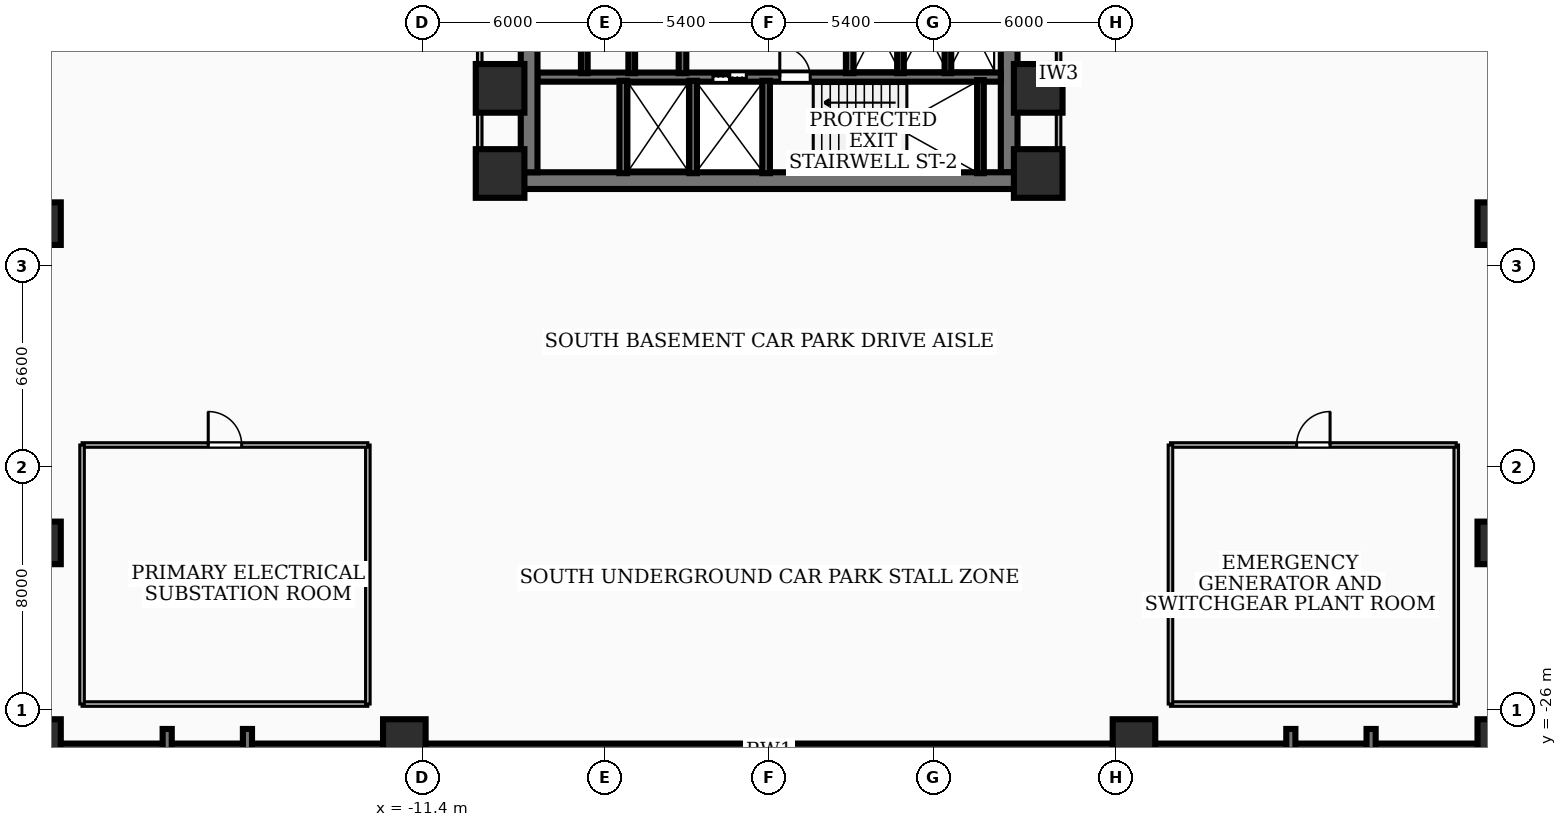
"""IFC4 building model, lengths in metres.
Left out: names, types, materials, properties, quantities, classifications, styles, units other than length and angle.
Written with IfcOpenShell. Run it as: python <this file> out.ifc"""

import sys

from ifc_helpers import new_model, si_unit, direction, frame, frame_2d, origin, origin_2d, place, context, subcontext, project, spatial, rectangle, extrude, element, fill, save


model = new_model("IFC4")
c1 = context("Model", 3, precision=1e-05, world=origin(), true_north=direction((0.0, 1.0)))
c2 = subcontext(c1, "Body", "Model", "MODEL_VIEW")
j1 = project(units=[si_unit("LENGTHUNIT", "METRE"), si_unit("PLANEANGLEUNIT", "RADIAN")], contexts=[c1])
p1 = place(None, origin())
s1 = spatial("IfcSite", under=j1, at=p1, CompositionType="ELEMENT")
p2 = place(p1, origin())
s2 = spatial("IfcBuilding", under=s1, at=p2, CompositionType="ELEMENT")
p3 = place(p2, frame((0.0, 0.0, -4.5)))
s3 = spatial("IfcBuildingStorey", under=s2, at=p3, CompositionType="ELEMENT", Elevation=-4.5)
p4 = place(p3, frame((8.78, -8.585, 0.0), z_axis=(0.0, 0.0, 1.0), x_axis=(-1.0, 0.0, 0.0)))
e1 = element("IfcWall", 1, at=p4, inside=s3, PredefinedType="SHEAR", context=c2, shape_type="SweptSolid", body=[
    extrude(rectangle(XDim=17.56, YDim=0.55, at=frame_2d((8.78, 0.0))), origin(), (0.0, 0.0, 1.0), 4.18),
])
for number, where, z_axis, x_axis in (
    (2, (-7.895, -8.31, 0.0), (0.0, 0.0, 1.0), (0.0, 1.0, 0.0)),
    (3, (7.895, -2.025, 0.0), (0.0, 0.0, 1.0), (0.0, -1.0, 0.0)),
):
    element("IfcWall", number, at=place(p3, frame(where, z_axis=z_axis, x_axis=x_axis)), inside=s3, PredefinedType="SHEAR", context=c2, shape_type="SweptSolid", body=[
        extrude(rectangle(XDim=6.285, YDim=0.55, at=frame_2d((3.143, 0.0))), origin(), (0.0, 0.0, 1.0), 4.18),
    ])
p5 = place(p3, frame((-7.62, -5.18, 0.0), z_axis=(0.0, 0.0, 1.0), x_axis=(1.0, 0.0, 0.0)))
e4 = element("IfcWall", 4, at=p5, inside=s3, PredefinedType="SOLIDWALL", context=c2, shape_type="SweptSolid", body=[
    extrude(rectangle(XDim=15.24, YDim=0.3, at=frame_2d((7.62, 0.0))), origin(), (0.0, 0.0, 1.0), 4.18),
])
p6 = place(p5, frame((5.77, 0.0, 0.0)))
e5 = element("IfcOpeningElement", 5, at=p6, cuts=e4, PredefinedType="OPENING", context=c2, shape_type="SweptSolid", body=[
    extrude(rectangle(XDim=1.1, YDim=2.15, at=frame_2d((0.55, 1.075))), frame((0.0, 0.16, 0.0), z_axis=(0.0, -1.0, 0.0), x_axis=(1.0, 0.0, 0.0)), (0.0, 0.0, 1.0), 0.32),
])
p7 = place(p5, frame((7.97, 0.0, 0.0)))
e6 = element("IfcOpeningElement", 6, at=p7, cuts=e4, PredefinedType="OPENING", context=c2, shape_type="SweptSolid", body=[
    extrude(rectangle(XDim=1.0, YDim=2.1, at=frame_2d((0.5, 1.05))), frame((0.0, 0.16, 0.0), z_axis=(0.0, -1.0, 0.0), x_axis=(1.0, 0.0, 0.0)), (0.0, 0.0, 1.0), 0.32),
])
p8 = place(p3, frame((6.95, -8.34, 0.0), z_axis=(0.0, 0.0, 1.0), x_axis=(0.0, 1.0, 0.0)))
e7 = element("IfcWall", 7, at=p8, inside=s3, PredefinedType="SOLIDWALL", context=c2, shape_type="SweptSolid", body=[
    extrude(rectangle(XDim=3.06, YDim=0.22, at=frame_2d((1.53, 0.0))), origin(), (0.0, 0.0, 1.0), 4.18),
])
for number, where, z_axis, x_axis in (
    (8, (-0.1, -8.34, 0.0), (0.0, 0.0, 1.0), (0.0, 1.0, 0.0)),
    (9, (-2.5, -8.34, 0.0), (0.0, 0.0, 1.0), (0.0, 1.0, 0.0)),
    (10, (-4.8, -8.34, 0.0), (0.0, 0.0, 1.0), (0.0, 1.0, 0.0)),
):
    element("IfcWall", number, at=place(p3, frame(where, z_axis=z_axis, x_axis=x_axis)), inside=s3, PredefinedType="SOLIDWALL", context=c2, shape_type="SweptSolid", body=[
        extrude(rectangle(XDim=3.04, YDim=0.25, at=frame_2d((1.52, 0.0))), origin(), (0.0, 0.0, 1.0), 4.18),
    ])
for number, where, z_axis, x_axis in (
    (11, (-2.85, -5.05, 0.0), (0.0, 0.0, 1.0), (0.0, 1.0, 0.0)),
    (12, (2.65, -5.05, 0.0), (0.0, 0.0, 1.0), (0.0, 1.0, 0.0)),
):
    element("IfcWall", number, at=place(p3, frame(where, z_axis=z_axis, x_axis=x_axis)), inside=s3, PredefinedType="SOLIDWALL", context=c2, shape_type="SweptSolid", body=[
        extrude(rectangle(XDim=3.07, YDim=0.25, at=frame_2d((1.535, 0.0))), origin(), (0.0, 0.0, 1.0), 4.18),
    ])
for number, where, z_axis, x_axis in (
    (13, (4.32, -5.05, 0.0), (0.0, 0.0, 1.0), (0.0, 1.0, 0.0)),
    (14, (5.88, -5.05, 0.0), (0.0, 0.0, 1.0), (0.0, 1.0, 0.0)),
    (15, (-6.08, -5.05, 0.0), (0.0, 0.0, 1.0), (0.0, 1.0, 0.0)),
    (16, (-4.52, -5.05, 0.0), (0.0, 0.0, 1.0), (0.0, 1.0, 0.0)),
):
    element("IfcWall", number, at=place(p3, frame(where, z_axis=z_axis, x_axis=x_axis)), inside=s3, PredefinedType="SOLIDWALL", context=c2, shape_type="SweptSolid", body=[
        extrude(rectangle(XDim=3.07, YDim=0.22, at=frame_2d((1.535, 0.0))), origin(), (0.0, 0.0, 1.0), 4.18),
    ])
p9 = place(p3, frame((35.75, -27.35, 0.0), z_axis=(0.0, 0.0, 1.0), x_axis=(-1.0, 0.0, 0.0)))
e17 = element("IfcWall", 17, at=p9, inside=s3, PredefinedType="USERDEFINED", context=c2, shape_type="SweptSolid", body=[
    extrude(rectangle(XDim=71.5, YDim=0.5, at=frame_2d((35.75, 0.0))), origin(), (0.0, 0.0, 1.0), 4.18),
])
p10 = place(p3, frame((-19.8, -28.58, -4.85), z_axis=(0.0, 0.0, 1.0), x_axis=(0.0, 1.0, 0.0)))
e18 = element("IfcWall", 18, at=p10, inside=s3, PredefinedType="SOLIDWALL", context=c2, shape_type="SweptSolid", body=[
    extrude(rectangle(XDim=1.96, YDim=0.3, at=frame_2d((0.98, 0.0))), origin(), (0.0, 0.0, 1.0), 9.145),
])
p11 = place(p3, frame((-17.16, -28.58, -4.85), z_axis=(0.0, 0.0, 1.0), x_axis=(0.0, 1.0, 0.0)))
e19 = element("IfcWall", 19, at=p11, inside=s3, PredefinedType="SOLIDWALL", context=c2, shape_type="SweptSolid", body=[
    extrude(rectangle(XDim=1.96, YDim=0.3, at=frame_2d((0.98, 0.0))), origin(), (0.0, 0.0, 1.0), 9.35),
])
p12 = place(p3, frame((19.8, -28.58, -4.85), z_axis=(0.0, 0.0, 1.0), x_axis=(0.0, 1.0, 0.0)))
e20 = element("IfcWall", 20, at=p12, inside=s3, PredefinedType="SOLIDWALL", context=c2, shape_type="SweptSolid", body=[
    extrude(rectangle(XDim=1.96, YDim=0.3, at=frame_2d((0.98, 0.0))), origin(), (0.0, 0.0, 1.0), 9.145),
])
p13 = place(p3, frame((17.16, -28.58, -4.85), z_axis=(0.0, 0.0, 1.0), x_axis=(0.0, 1.0, 0.0)))
e21 = element("IfcWall", 21, at=p13, inside=s3, PredefinedType="SOLIDWALL", context=c2, shape_type="SweptSolid", body=[
    extrude(rectangle(XDim=1.96, YDim=0.3, at=frame_2d((0.98, 0.0))), origin(), (0.0, 0.0, 1.0), 9.35),
])
for number, where, z_axis, x_axis in (
    (22, (-8.85, -5.55, 0.0), (0.0, 0.0, 1.0), (1.0, 0.0, 0.0)),
    (23, (8.85, -5.55, 0.0), (0.0, 0.0, 1.0), (1.0, 0.0, 0.0)),
    (24, (8.85, -8.35, 0.0), (0.0, 0.0, 1.0), (1.0, 0.0, 0.0)),
    (25, (-8.85, -8.35, 0.0), (0.0, 0.0, 1.0), (1.0, 0.0, 0.0)),
):
    element("IfcColumn", number, at=place(p3, frame(where, z_axis=z_axis, x_axis=x_axis)), inside=s3, PredefinedType="COLUMN", context=c2, shape_type="SweptSolid", body=[
        extrude(rectangle(XDim=1.6, YDim=1.6, at=origin_2d()), origin(), (0.0, 0.0, 1.0), 4.5),
    ])
for number, where, z_axis, x_axis in (
    (26, (-24.0, -27.0, 0.0), (0.0, 0.0, 1.0), (1.0, 0.0, 0.0)),
    (27, (-12.0, -27.0, 0.0), (0.0, 0.0, 1.0), (1.0, 0.0, 0.0)),
    (28, (12.0, -27.0, 0.0), (0.0, 0.0, 1.0), (1.0, 0.0, 0.0)),
    (29, (24.0, -27.0, 0.0), (0.0, 0.0, 1.0), (1.0, 0.0, 0.0)),
    (30, (-24.0, -10.0, 0.0), (0.0, 0.0, 1.0), (1.0, 0.0, 0.0)),
    (31, (24.0, -10.0, 0.0), (0.0, 0.0, 1.0), (1.0, 0.0, 0.0)),
    (32, (-24.0, -20.5, 0.0), (0.0, 0.0, 1.0), (1.0, 0.0, 0.0)),
    (33, (24.0, -20.5, 0.0), (0.0, 0.0, 1.0), (1.0, 0.0, 0.0)),
):
    element("IfcColumn", number, at=place(p3, frame(where, z_axis=z_axis, x_axis=x_axis)), inside=s3, PredefinedType="COLUMN", context=c2, shape_type="SweptSolid", body=[
        extrude(rectangle(XDim=1.4, YDim=1.4, at=origin_2d()), origin(), (0.0, 0.0, 1.0), 4.5),
    ])
for number, where, z_axis, x_axis in (
    (34, (-9.52, -8.38, 0.0), (0.0, 0.0, 1.0), (0.0, 1.0, 0.0)),
    (35, (9.52, -8.38, 0.0), (0.0, 0.0, 1.0), (0.0, 1.0, 0.0)),
):
    element("IfcWall", number, at=place(p3, frame(where, z_axis=z_axis, x_axis=x_axis)), inside=s3, PredefinedType="PARTITIONING", context=c2, shape_type="SweptSolid", body=[
        extrude(rectangle(XDim=6.63, YDim=0.15, at=frame_2d((3.315, 0.0))), origin(), (0.0, 0.0, 1.0), 3.072),
    ])
p14 = place(p3, frame((-22.6, -17.28, 0.0), z_axis=(0.0, 0.0, 1.0), x_axis=(1.0, 0.0, 0.0)))
e36 = element("IfcWall", 36, at=p14, inside=s3, PredefinedType="PARTITIONING", context=c2, shape_type="SweptSolid", body=[
    extrude(rectangle(XDim=9.4, YDim=0.15, at=frame_2d((4.7, 0.0))), origin(), (0.0, 0.0, 1.0), 4.18),
])
p15 = place(p14, frame((4.15, 0.0, 0.0)))
e37 = element("IfcOpeningElement", 37, at=p15, cuts=e36, PredefinedType="OPENING", context=c2, shape_type="SweptSolid", body=[
    extrude(rectangle(XDim=1.1, YDim=2.15, at=frame_2d((0.55, 1.075))), frame((0.0, 0.085, 0.0), z_axis=(0.0, -1.0, 0.0), x_axis=(1.0, 0.0, 0.0)), (0.0, 0.0, 1.0), 0.17),
])
for number, where, z_axis, x_axis in (
    (38, (-22.6, -25.8, 0.0), (0.0, 0.0, 1.0), (0.0, 1.0, 0.0)),
    (39, (-13.2, -25.8, 0.0), (0.0, 0.0, 1.0), (0.0, 1.0, 0.0)),
):
    element("IfcWall", number, at=place(p3, frame(where, z_axis=z_axis, x_axis=x_axis)), inside=s3, PredefinedType="PARTITIONING", context=c2, shape_type="SweptSolid", body=[
        extrude(rectangle(XDim=8.52, YDim=0.15, at=frame_2d((4.26, 0.0))), origin(), (0.0, 0.0, 1.0), 4.18),
    ])
p16 = place(p3, frame((-22.6, -25.8, 0.0), z_axis=(0.0, 0.0, 1.0), x_axis=(1.0, 0.0, 0.0)))
e40 = element("IfcWall", 40, at=p16, inside=s3, PredefinedType="PARTITIONING", context=c2, shape_type="SweptSolid", body=[
    extrude(rectangle(XDim=9.4, YDim=0.15, at=frame_2d((4.7, 0.0))), origin(), (0.0, 0.0, 1.0), 4.18),
])
p17 = place(p3, frame((13.2, -17.28, 0.0), z_axis=(0.0, 0.0, 1.0), x_axis=(1.0, 0.0, 0.0)))
e41 = element("IfcWall", 41, at=p17, inside=s3, PredefinedType="PARTITIONING", context=c2, shape_type="SweptSolid", body=[
    extrude(rectangle(XDim=9.4, YDim=0.15, at=frame_2d((4.7, 0.0))), origin(), (0.0, 0.0, 1.0), 4.18),
])
p18 = place(p17, frame((4.15, 0.0, 0.0)))
e42 = element("IfcOpeningElement", 42, at=p18, cuts=e41, PredefinedType="OPENING", context=c2, shape_type="SweptSolid", body=[
    extrude(rectangle(XDim=1.1, YDim=2.15, at=frame_2d((0.55, 1.075))), frame((0.0, 0.085, 0.0), z_axis=(0.0, -1.0, 0.0), x_axis=(1.0, 0.0, 0.0)), (0.0, 0.0, 1.0), 0.17),
])
for number, where, z_axis, x_axis in (
    (43, (13.2, -25.8, 0.0), (0.0, 0.0, 1.0), (0.0, 1.0, 0.0)),
    (44, (22.6, -25.8, 0.0), (0.0, 0.0, 1.0), (0.0, 1.0, 0.0)),
):
    element("IfcWall", number, at=place(p3, frame(where, z_axis=z_axis, x_axis=x_axis)), inside=s3, PredefinedType="PARTITIONING", context=c2, shape_type="SweptSolid", body=[
        extrude(rectangle(XDim=8.52, YDim=0.15, at=frame_2d((4.26, 0.0))), origin(), (0.0, 0.0, 1.0), 4.18),
    ])
p19 = place(p3, frame((13.2, -25.8, 0.0), z_axis=(0.0, 0.0, 1.0), x_axis=(1.0, 0.0, 0.0)))
e45 = element("IfcWall", 45, at=p19, inside=s3, PredefinedType="PARTITIONING", context=c2, shape_type="SweptSolid", body=[
    extrude(rectangle(XDim=9.4, YDim=0.15, at=frame_2d((4.7, 0.0))), origin(), (0.0, 0.0, 1.0), 4.18),
])
p20 = place(p6, origin())
e46 = element("IfcDoor", 46, at=p20, inside=s3, OperationType="DOUBLE_DOOR_SLIDING", PredefinedType="DOOR", context=c2, shape_type="SweptSolid", body=[
    extrude(rectangle(XDim=1.1, YDim=2.15, at=frame_2d((0.55, 1.075))), frame((0.0, 0.025, 0.0), z_axis=(0.0, -1.0, 0.0), x_axis=(1.0, 0.0, 0.0)), (0.0, 0.0, 1.0), 0.05),
])
fill(e5, e46)
p21 = place(p7, origin())
e47 = element("IfcDoor", 47, at=p21, inside=s3, OperationType="SINGLE_SWING_LEFT", PredefinedType="DOOR", context=c2, shape_type="SweptSolid", body=[
    extrude(rectangle(XDim=1.0, YDim=2.1, at=frame_2d((0.5, 1.05))), frame((0.0, 0.025, 0.0), z_axis=(0.0, -1.0, 0.0), x_axis=(1.0, 0.0, 0.0)), (0.0, 0.0, 1.0), 0.05),
])
fill(e6, e47)
p22 = place(p15, origin())
e48 = element("IfcDoor", 48, at=p22, inside=s3, OperationType="SINGLE_SWING_LEFT", PredefinedType="DOOR", context=c2, shape_type="SweptSolid", body=[
    extrude(rectangle(XDim=1.1, YDim=2.15, at=frame_2d((0.55, 1.075))), frame((0.0, 0.025, 0.0), z_axis=(0.0, -1.0, 0.0), x_axis=(1.0, 0.0, 0.0)), (0.0, 0.0, 1.0), 0.05),
])
fill(e37, e48)
p23 = place(p18, origin())
e49 = element("IfcDoor", 49, at=p23, inside=s3, OperationType="SINGLE_SWING_RIGHT", PredefinedType="DOOR", context=c2, shape_type="SweptSolid", body=[
    extrude(rectangle(XDim=1.1, YDim=2.15, at=frame_2d((0.55, 1.075))), frame((0.0, 0.025, 0.0), z_axis=(0.0, -1.0, 0.0), x_axis=(1.0, 0.0, 0.0)), (0.0, 0.0, 1.0), 0.05),
])
fill(e42, e49)
save(model, sys.argv[1])
